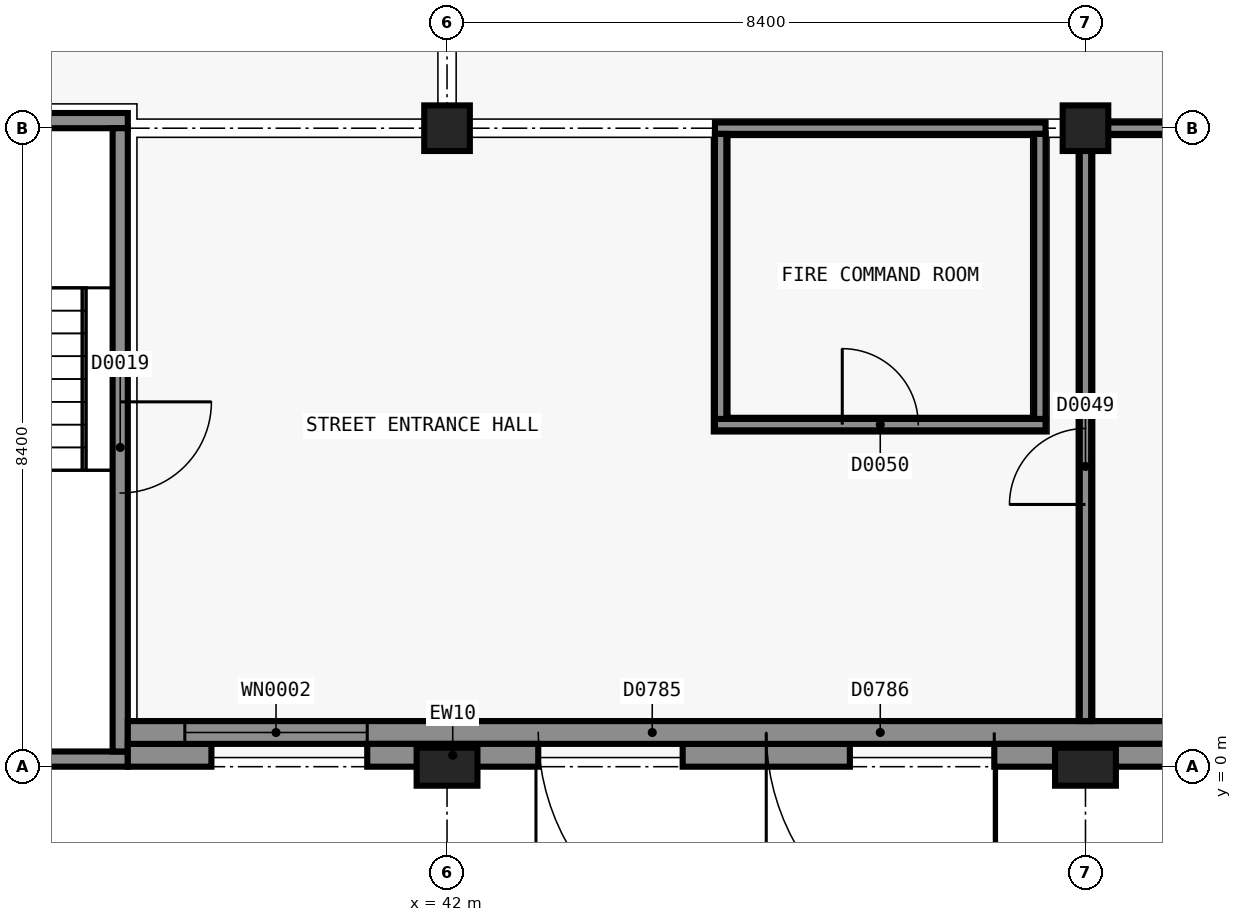
"""IFC4 building model, lengths in metres.
Left out: names, types, materials, properties, quantities, classifications, styles, units other than length and angle.
Written with IfcOpenShell. Run it as: python <this file> out.ifc"""

import sys

from ifc_helpers import new_model, si_unit, direction, frame, frame_2d, origin, origin_2d, place, context, subcontext, project, spatial, rectangle, extrude, element, fill, save


model = new_model("IFC4")
c1 = context("Model", 3, precision=1e-05, world=origin(), true_north=direction((0.0, 1.0)))
c2 = subcontext(c1, "Body", "Model", "MODEL_VIEW")
j1 = project(units=[si_unit("LENGTHUNIT", "METRE"), si_unit("PLANEANGLEUNIT", "RADIAN")], contexts=[c1])
p1 = place(None, origin())
s1 = spatial("IfcSite", under=j1, at=p1, CompositionType="ELEMENT")
p2 = place(p1, origin())
s2 = spatial("IfcBuilding", under=s1, at=p2, CompositionType="ELEMENT")
p3 = place(p2, origin())
s3 = spatial("IfcBuildingStorey", under=s2, at=p3, CompositionType="ELEMENT", Elevation=0.0)
p4 = place(p3, frame((37.8, 0.1, -0.3), z_axis=(0.0, 0.0, 1.0), x_axis=(-1.0, 0.0, 0.0)))
e1 = element("IfcWall", 1, at=p4, inside=s3, PredefinedType="SHEAR", context=c2, shape_type="SweptSolid", body=[
    extrude(rectangle(XDim=3.9, YDim=0.2, at=frame_2d((1.95, 0.0))), origin(), (0.0, 0.0, 1.0), 5.7),
])
p5 = place(p3, frame((33.9, 8.5, -0.3), z_axis=(0.0, 0.0, 1.0), x_axis=(1.0, 0.0, 0.0)))
e2 = element("IfcWall", 2, at=p5, inside=s3, PredefinedType="SHEAR", context=c2, shape_type="SweptSolid", body=[
    extrude(rectangle(XDim=3.9, YDim=0.2, at=frame_2d((1.95, 0.0))), origin(), (0.0, 0.0, 1.0), 5.7),
])
p6 = place(p5, frame((1.2, 0.0, 0.3)))
e3 = element("IfcOpeningElement", 3, at=p6, cuts=e2, PredefinedType="OPENING", context=c2, shape_type="SweptSolid", body=[
    extrude(rectangle(XDim=1.2, YDim=2.1, at=frame_2d((0.6, 1.05))), frame((0.0, 0.11, 0.0), z_axis=(0.0, -1.0, 0.0), x_axis=(1.0, 0.0, 0.0)), (0.0, 0.0, 1.0), 0.22),
])
p7 = place(p3, frame((37.7, 8.4, -0.3), z_axis=(0.0, 0.0, 1.0), x_axis=(0.0, -1.0, 0.0)))
e4 = element("IfcWall", 4, at=p7, inside=s3, PredefinedType="SHEAR", context=c2, shape_type="SweptSolid", body=[
    extrude(rectangle(XDim=8.2, YDim=0.2, at=frame_2d((4.1, 0.0))), origin(), (0.0, 0.0, 1.0), 5.7),
])
p8 = place(p7, frame((3.6, 0.0, 0.3)))
e5 = element("IfcOpeningElement", 5, at=p8, cuts=e4, PredefinedType="OPENING", context=c2, shape_type="SweptSolid", body=[
    extrude(rectangle(XDim=1.2, YDim=2.1, at=frame_2d((0.6, 1.05))), frame((0.0, 0.11, 0.0), z_axis=(0.0, -1.0, 0.0), x_axis=(1.0, 0.0, 0.0)), (0.0, 0.0, 1.0), 0.22),
])
p9 = place(p3, frame((42.0, 0.0, -0.3), z_axis=(0.0, 0.0, 1.0), x_axis=(1.0, 0.0, 0.0)))
e6 = element("IfcColumn", 6, at=p9, inside=s3, PredefinedType="COLUMN", context=c2, shape_type="SweptSolid", body=[
    extrude(rectangle(XDim=0.8, YDim=0.5, at=origin_2d()), origin(), (0.0, 0.0, 1.0), 5.7),
])
p10 = place(p3, frame((42.0, 8.4, -0.3), z_axis=(0.0, 0.0, 1.0), x_axis=(1.0, 0.0, 0.0)))
e7 = element("IfcColumn", 7, at=p10, inside=s3, PredefinedType="COLUMN", context=c2, shape_type="SweptSolid", body=[
    extrude(rectangle(XDim=0.6, YDim=0.6, at=origin_2d()), origin(), (0.0, 0.0, 1.0), 5.7),
])
p11 = place(p3, frame((50.4, 0.0, -0.3), z_axis=(0.0, 0.0, 1.0), x_axis=(1.0, 0.0, 0.0)))
e8 = element("IfcColumn", 8, at=p11, inside=s3, PredefinedType="COLUMN", context=c2, shape_type="SweptSolid", body=[
    extrude(rectangle(XDim=0.8, YDim=0.5, at=origin_2d()), origin(), (0.0, 0.0, 1.0), 5.7),
])
p12 = place(p3, frame((50.4, 8.4, -0.3), z_axis=(0.0, 0.0, 1.0), x_axis=(1.0, 0.0, 0.0)))
e9 = element("IfcColumn", 9, at=p12, inside=s3, PredefinedType="COLUMN", context=c2, shape_type="SweptSolid", body=[
    extrude(rectangle(XDim=0.6, YDim=0.6, at=origin_2d()), origin(), (0.0, 0.0, 1.0), 5.7),
])
p13 = place(p3, frame((38.9, 0.15, -1.2), z_axis=(0.0, 0.0, 1.0), x_axis=(-1.0, 0.0, 0.0)))
e10 = element("IfcWall", 10, at=p13, inside=s3, PredefinedType="SOLIDWALL", context=c2, shape_type="SweptSolid", body=[
    extrude(rectangle(XDim=1.1, YDim=0.3, at=frame_2d((0.55, 0.0))), origin(), (0.0, 0.0, 1.0), 0.9),
])
p14 = place(p3, frame((47.3, 0.15, -1.2), z_axis=(0.0, 0.0, 1.0), x_axis=(-1.0, 0.0, 0.0)))
e11 = element("IfcWall", 11, at=p14, inside=s3, PredefinedType="SOLIDWALL", context=c2, shape_type="SweptSolid", body=[
    extrude(rectangle(XDim=2.2, YDim=0.3, at=frame_2d((1.1, 0.0))), origin(), (0.0, 0.0, 1.0), 0.9),
])
p15 = place(p3, frame((58.8, 0.45, 0.0), z_axis=(0.0, 0.0, 1.0), x_axis=(-1.0, 0.0, 0.0)))
e12 = element("IfcWall", 12, at=p15, inside=s3, PredefinedType="SOLIDWALL", context=c2, shape_type="SweptSolid", body=[
    extrude(rectangle(XDim=21.0, YDim=0.3, at=frame_2d((10.5, 0.0))), origin(), (0.0, 0.0, 1.0), 5.1),
])
p16 = place(p15, frame((17.85, 0.0, 0.9)))
e13 = element("IfcOpeningElement", 13, at=p16, cuts=e12, PredefinedType="OPENING", context=c2, shape_type="SweptSolid", body=[
    extrude(rectangle(XDim=2.4, YDim=1.5, at=frame_2d((1.2, 0.75))), frame((0.0, 0.16, 0.0), z_axis=(0.0, -1.0, 0.0), x_axis=(1.0, 0.0, 0.0)), (0.0, 0.0, 1.0), 0.32),
])
p17 = place(p15, frame((3.0, 0.0, 0.9)))
e14 = element("IfcOpeningElement", 14, at=p17, cuts=e12, PredefinedType="OPENING", context=c2, shape_type="SweptSolid", body=[
    extrude(rectangle(XDim=2.4, YDim=1.5, at=frame_2d((1.2, 0.75))), frame((0.0, 0.16, 0.0), z_axis=(0.0, -1.0, 0.0), x_axis=(1.0, 0.0, 0.0)), (0.0, 0.0, 1.0), 0.32),
])
p18 = place(p15, frame((12.6, 0.0, 0.0)))
e15 = element("IfcOpeningElement", 15, at=p18, cuts=e12, PredefinedType="OPENING", context=c2, shape_type="SweptSolid", body=[
    extrude(rectangle(XDim=3.0, YDim=2.8, at=frame_2d((1.5, 1.4))), frame((0.0, 0.16, 0.0), z_axis=(0.0, -1.0, 0.0), x_axis=(1.0, 0.0, 0.0)), (0.0, 0.0, 1.0), 0.32),
])
p19 = place(p15, frame((9.6, 0.0, 0.0)))
e16 = element("IfcOpeningElement", 16, at=p19, cuts=e12, PredefinedType="OPENING", context=c2, shape_type="SweptSolid", body=[
    extrude(rectangle(XDim=3.0, YDim=2.8, at=frame_2d((1.5, 1.4))), frame((0.0, 0.16, 0.0), z_axis=(0.0, -1.0, 0.0), x_axis=(1.0, 0.0, 0.0)), (0.0, 0.0, 1.0), 0.32),
])
p20 = place(p3, frame((43.2, 0.15, 0.0), z_axis=(0.0, 0.0, 1.0), x_axis=(-1.0, 0.0, 0.0)))
e17 = element("IfcWall", 17, at=p20, inside=s3, PredefinedType="SOLIDWALL", context=c2, shape_type="SweptSolid", body=[
    extrude(rectangle(XDim=2.25, YDim=0.3, at=frame_2d((1.125, 0.0))), origin(), (0.0, 0.0, 1.0), 4.4),
])
p21 = place(p3, frame((53.4, 0.15, 0.0), z_axis=(0.0, 0.0, 1.0), x_axis=(-1.0, 0.0, 0.0)))
e18 = element("IfcWall", 18, at=p21, inside=s3, PredefinedType="SOLIDWALL", context=c2, shape_type="SweptSolid", body=[
    extrude(rectangle(XDim=4.2, YDim=0.3, at=frame_2d((2.1, 0.0))), origin(), (0.0, 0.0, 1.0), 4.4),
])
p22 = place(p3, frame((45.525, 4.5, 0.0), z_axis=(0.0, 0.0, 1.0), x_axis=(1.0, 0.0, 0.0)))
e19 = element("IfcWall", 19, at=p22, inside=s3, PredefinedType="PARTITIONING", context=c2, shape_type="SweptSolid", body=[
    extrude(rectangle(XDim=4.35, YDim=0.15, at=frame_2d((2.175, 0.0))), origin(), (0.0, 0.0, 1.0), 4.4),
])
p23 = place(p22, frame((1.675, 0.0, 0.0)))
e20 = element("IfcOpeningElement", 20, at=p23, cuts=e19, PredefinedType="OPENING", context=c2, shape_type="SweptSolid", body=[
    extrude(rectangle(XDim=1.0, YDim=2.1, at=frame_2d((0.5, 1.05))), frame((0.0, 0.085, 0.0), z_axis=(0.0, -1.0, 0.0), x_axis=(1.0, 0.0, 0.0)), (0.0, 0.0, 1.0), 0.17),
])
p24 = place(p3, frame((45.525, 8.4, 0.0), z_axis=(0.0, 0.0, 1.0), x_axis=(1.0, 0.0, 0.0)))
e21 = element("IfcWall", 21, at=p24, inside=s3, PredefinedType="PARTITIONING", context=c2, shape_type="SweptSolid", body=[
    extrude(rectangle(XDim=4.35, YDim=0.15, at=frame_2d((2.175, 0.0))), origin(), (0.0, 0.0, 1.0), 4.4),
])
p25 = place(p3, frame((50.325, 8.4, 0.0), z_axis=(0.0, 0.0, 1.0), x_axis=(1.0, 0.0, 0.0)))
e22 = element("IfcWall", 22, at=p25, inside=s3, PredefinedType="PARTITIONING", context=c2, shape_type="SweptSolid", body=[
    extrude(rectangle(XDim=7.775, YDim=0.15, at=frame_2d((3.888, 0.0))), origin(), (0.0, 0.0, 1.0), 4.4),
])
for number, where, z_axis, x_axis in (
    (23, (45.6, 4.575, 0.0), (0.0, 0.0, 1.0), (0.0, 1.0, 0.0)),
    (24, (49.8, 4.575, 0.0), (0.0, 0.0, 1.0), (0.0, 1.0, 0.0)),
):
    element("IfcWall", number, at=place(p3, frame(where, z_axis=z_axis, x_axis=x_axis)), inside=s3, PredefinedType="PARTITIONING", context=c2, shape_type="SweptSolid", body=[
        extrude(rectangle(XDim=3.75, YDim=0.15, at=frame_2d((1.875, 0.0))), origin(), (0.0, 0.0, 1.0), 4.4),
    ])
p26 = place(p3, frame((50.4, 0.6, 0.0), z_axis=(0.0, 0.0, 1.0), x_axis=(0.0, 1.0, 0.0)))
e25 = element("IfcWall", 25, at=p26, inside=s3, PredefinedType="PARTITIONING", context=c2, shape_type="SweptSolid", body=[
    extrude(rectangle(XDim=7.725, YDim=0.15, at=frame_2d((3.862, 0.0))), origin(), (0.0, 0.0, 1.0), 4.4),
])
p27 = place(p26, frame((2.85, 0.0, 0.0)))
e26 = element("IfcOpeningElement", 26, at=p27, cuts=e25, PredefinedType="OPENING", context=c2, shape_type="SweptSolid", body=[
    extrude(rectangle(XDim=1.0, YDim=2.1, at=frame_2d((0.5, 1.05))), frame((0.0, 0.085, 0.0), z_axis=(0.0, -1.0, 0.0), x_axis=(1.0, 0.0, 0.0)), (0.0, 0.0, 1.0), 0.17),
])
p28 = place(p16, origin())
e27 = element("IfcWindow", 27, at=p28, inside=s3, PartitioningType="SINGLE_PANEL", PredefinedType="WINDOW", context=c2, shape_type="SweptSolid", body=[
    extrude(rectangle(XDim=2.4, YDim=1.5, at=frame_2d((1.2, 0.75))), frame((0.0, 0.03, 0.0), z_axis=(0.0, -1.0, 0.0), x_axis=(1.0, 0.0, 0.0)), (0.0, 0.0, 1.0), 0.06),
])
fill(e13, e27)
p29 = place(p18, origin())
e28 = element("IfcDoor", 28, at=p29, inside=s3, OperationType="DOUBLE_DOOR_DOUBLE_SWING", PredefinedType="DOOR", context=c2, shape_type="SweptSolid", body=[
    extrude(rectangle(XDim=3.0, YDim=2.8, at=frame_2d((1.5, 1.4))), frame((0.0, 0.025, 0.0), z_axis=(0.0, -1.0, 0.0), x_axis=(1.0, 0.0, 0.0)), (0.0, 0.0, 1.0), 0.05),
])
fill(e15, e28)
p30 = place(p19, origin())
e29 = element("IfcDoor", 29, at=p30, inside=s3, OperationType="DOUBLE_DOOR_DOUBLE_SWING", PredefinedType="DOOR", context=c2, shape_type="SweptSolid", body=[
    extrude(rectangle(XDim=3.0, YDim=2.8, at=frame_2d((1.5, 1.4))), frame((0.0, 0.025, 0.0), z_axis=(0.0, -1.0, 0.0), x_axis=(1.0, 0.0, 0.0)), (0.0, 0.0, 1.0), 0.05),
])
fill(e16, e29)
p31 = place(p8, origin())
e30 = element("IfcDoor", 30, at=p31, inside=s3, OperationType="SINGLE_SWING_RIGHT", PredefinedType="DOOR", context=c2, shape_type="SweptSolid", body=[
    extrude(rectangle(XDim=1.2, YDim=2.1, at=frame_2d((0.6, 1.05))), frame((0.0, 0.025, 0.0), z_axis=(0.0, -1.0, 0.0), x_axis=(1.0, 0.0, 0.0)), (0.0, 0.0, 1.0), 0.05),
])
fill(e5, e30)
p32 = place(p27, origin())
e31 = element("IfcDoor", 31, at=p32, inside=s3, OperationType="SINGLE_SWING_LEFT", PredefinedType="DOOR", context=c2, shape_type="SweptSolid", body=[
    extrude(rectangle(XDim=1.0, YDim=2.1, at=frame_2d((0.5, 1.05))), frame((0.0, 0.025, 0.0), z_axis=(0.0, -1.0, 0.0), x_axis=(1.0, 0.0, 0.0)), (0.0, 0.0, 1.0), 0.05),
])
fill(e26, e31)
p33 = place(p23, origin())
e32 = element("IfcDoor", 32, at=p33, inside=s3, OperationType="SINGLE_SWING_RIGHT", PredefinedType="DOOR", context=c2, shape_type="SweptSolid", body=[
    extrude(rectangle(XDim=1.0, YDim=2.1, at=frame_2d((0.5, 1.05))), frame((0.0, 0.025, 0.0), z_axis=(0.0, -1.0, 0.0), x_axis=(1.0, 0.0, 0.0)), (0.0, 0.0, 1.0), 0.05),
])
fill(e20, e32)
save(model, sys.argv[1])
